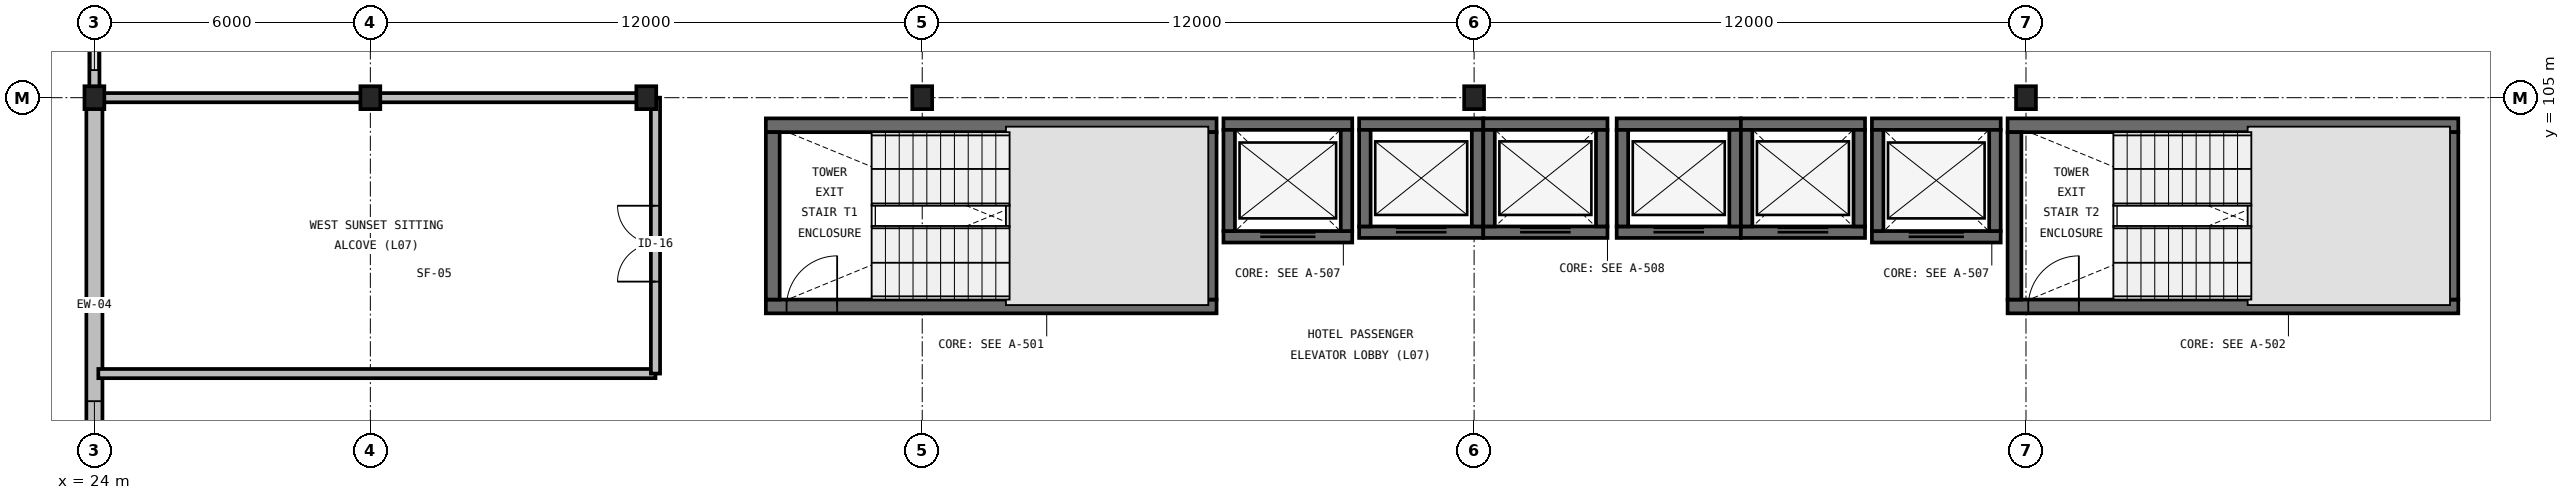
"""IFC4 building model, lengths in metres.
Left out: names, types, materials, properties, quantities, classifications, styles, units other than length and angle.
Written with IfcOpenShell. Run it as: python <this file> out.ifc"""

import sys

from ifc_helpers import new_model, si_unit, direction, frame, frame_2d, origin, origin_2d, place, context, subcontext, project, spatial, rectangle, i_section, extrude, element, fill, save


model = new_model("IFC4")
c1 = context("Model", 3, precision=1e-05, world=origin(), true_north=direction((0.0, 1.0)))
c2 = subcontext(c1, "Body", "Model", "MODEL_VIEW")
j1 = project(units=[si_unit("LENGTHUNIT", "METRE"), si_unit("PLANEANGLEUNIT", "RADIAN")], contexts=[c1])
p1 = place(None, origin())
s1 = spatial("IfcSite", under=j1, at=p1, CompositionType="ELEMENT")
p2 = place(p1, origin())
s2 = spatial("IfcBuilding", under=s1, at=p2, CompositionType="ELEMENT")
p3 = place(p2, frame((0.0, 0.0, 34.8)))
s3 = spatial("IfcBuildingStorey", under=s2, at=p3, CompositionType="ELEMENT", Elevation=34.8)
for number, where, z_axis, x_axis in (
    (1, (24.0, 105.0, 0.0), (0.0, 0.0, 1.0), (1.0, 0.0, 0.0)),
    (2, (30.0, 105.0, 0.0), (0.0, 0.0, 1.0), (1.0, 0.0, 0.0)),
    (3, (36.0, 105.0, 0.0), (0.0, 0.0, 1.0), (1.0, 0.0, 0.0)),
    (4, (42.0, 105.0, 0.0), (0.0, 0.0, 1.0), (1.0, 0.0, 0.0)),
    (5, (54.0, 105.0, 0.0), (0.0, 0.0, 1.0), (1.0, 0.0, 0.0)),
    (6, (66.0, 105.0, 0.0), (0.0, 0.0, 1.0), (1.0, 0.0, 0.0)),
):
    element("IfcColumn", number, at=place(p3, frame(where, z_axis=z_axis, x_axis=x_axis)), inside=s3, PredefinedType="COLUMN", context=c2, shape_type="SweptSolid", body=[
        extrude(i_section(OverallWidth=0.432, OverallDepth=0.498, WebThickness=0.056, FlangeThickness=0.089, FilletRadius=0.031, at=origin_2d()), origin(), (0.0, 0.0, 1.0), 3.6),
    ])
p4 = place(p3, frame((38.6, 100.46, 0.0), z_axis=(0.0, 0.0, 1.0), x_axis=(1.0, 0.0, 0.0)))
e7 = element("IfcWall", 7, at=p4, inside=s3, PredefinedType="SHEAR", context=c2, shape_type="SweptSolid", body=[
    extrude(rectangle(XDim=9.8, YDim=0.3, at=frame_2d((4.9, 0.0))), origin(), (0.0, 0.0, 1.0), 3.6),
])
p5 = place(p4, frame((0.45, 0.0, 0.0)))
e8 = element("IfcOpeningElement", 8, at=p5, cuts=e7, PredefinedType="OPENING", context=c2, shape_type="SweptSolid", body=[
    extrude(rectangle(XDim=1.1, YDim=2.2, at=frame_2d((0.55, 1.1))), frame((0.0, 0.165, 0.0), z_axis=(0.0, -1.0, 0.0), x_axis=(1.0, 0.0, 0.0)), (0.0, 0.0, 1.0), 0.33),
])
p6 = place(p3, frame((48.4, 104.4, 0.0), z_axis=(0.0, 0.0, 1.0), x_axis=(-1.0, 0.0, 0.0)))
e9 = element("IfcWall", 9, at=p6, inside=s3, PredefinedType="SHEAR", context=c2, shape_type="SweptSolid", body=[
    extrude(rectangle(XDim=9.8, YDim=0.3, at=frame_2d((4.9, 0.0))), origin(), (0.0, 0.0, 1.0), 3.6),
])
for number, where, z_axis, x_axis in (
    (10, (38.75, 104.25, 0.0), (0.0, 0.0, 1.0), (0.0, -1.0, 0.0)),
    (11, (48.25, 100.61, 0.0), (0.0, 0.0, 1.0), (0.0, 1.0, 0.0)),
):
    element("IfcWall", number, at=place(p3, frame(where, z_axis=z_axis, x_axis=x_axis)), inside=s3, PredefinedType="SHEAR", context=c2, shape_type="SweptSolid", body=[
        extrude(rectangle(XDim=3.64, YDim=0.3, at=frame_2d((1.82, 0.0))), origin(), (0.0, 0.0, 1.0), 3.6),
    ])
p7 = place(p3, frame((65.6, 100.46, 0.0), z_axis=(0.0, 0.0, 1.0), x_axis=(1.0, 0.0, 0.0)))
e12 = element("IfcWall", 12, at=p7, inside=s3, PredefinedType="SHEAR", context=c2, shape_type="SweptSolid", body=[
    extrude(rectangle(XDim=9.8, YDim=0.3, at=frame_2d((4.9, 0.0))), origin(), (0.0, 0.0, 1.0), 3.6),
])
p8 = place(p7, frame((0.45, 0.0, 0.0)))
e13 = element("IfcOpeningElement", 13, at=p8, cuts=e12, PredefinedType="OPENING", context=c2, shape_type="SweptSolid", body=[
    extrude(rectangle(XDim=1.1, YDim=2.2, at=frame_2d((0.55, 1.1))), frame((0.0, 0.165, 0.0), z_axis=(0.0, -1.0, 0.0), x_axis=(1.0, 0.0, 0.0)), (0.0, 0.0, 1.0), 0.33),
])
p9 = place(p3, frame((75.4, 104.4, 0.0), z_axis=(0.0, 0.0, 1.0), x_axis=(-1.0, 0.0, 0.0)))
e14 = element("IfcWall", 14, at=p9, inside=s3, PredefinedType="SHEAR", context=c2, shape_type="SweptSolid", body=[
    extrude(rectangle(XDim=9.8, YDim=0.3, at=frame_2d((4.9, 0.0))), origin(), (0.0, 0.0, 1.0), 3.6),
])
for number, where, z_axis, x_axis in (
    (15, (65.75, 104.25, 0.0), (0.0, 0.0, 1.0), (0.0, -1.0, 0.0)),
    (16, (75.25, 100.61, 0.0), (0.0, 0.0, 1.0), (0.0, 1.0, 0.0)),
):
    element("IfcWall", number, at=place(p3, frame(where, z_axis=z_axis, x_axis=x_axis)), inside=s3, PredefinedType="SHEAR", context=c2, shape_type="SweptSolid", body=[
        extrude(rectangle(XDim=3.64, YDim=0.3, at=frame_2d((1.82, 0.0))), origin(), (0.0, 0.0, 1.0), 3.6),
    ])
p10 = place(p3, frame((48.55, 101.975, 0.0), z_axis=(0.0, 0.0, 1.0), x_axis=(1.0, 0.0, 0.0)))
e17 = element("IfcWall", 17, at=p10, inside=s3, PredefinedType="SHEAR", context=c2, shape_type="SweptSolid", body=[
    extrude(rectangle(XDim=2.8, YDim=0.25, at=frame_2d((1.4, 0.0))), origin(), (0.0, 0.0, 1.0), 3.6),
])
p11 = place(p10, frame((0.8, 0.0, 0.0)))
e18 = element("IfcOpeningElement", 18, at=p11, cuts=e17, PredefinedType="OPENING", context=c2, shape_type="SweptSolid", body=[
    extrude(rectangle(XDim=1.2, YDim=2.2, at=frame_2d((0.6, 1.1))), frame((0.0, 0.14, 0.0), z_axis=(0.0, -1.0, 0.0), x_axis=(1.0, 0.0, 0.0)), (0.0, 0.0, 1.0), 0.28),
])
p12 = place(p3, frame((51.35, 104.425, 0.0), z_axis=(0.0, 0.0, 1.0), x_axis=(-1.0, 0.0, 0.0)))
e19 = element("IfcWall", 19, at=p12, inside=s3, PredefinedType="SHEAR", context=c2, shape_type="SweptSolid", body=[
    extrude(rectangle(XDim=2.8, YDim=0.25, at=frame_2d((1.4, 0.0))), origin(), (0.0, 0.0, 1.0), 3.6),
])
for number, where, z_axis, x_axis in (
    (20, (48.675, 104.3, 0.0), (0.0, 0.0, 1.0), (0.0, -1.0, 0.0)),
    (21, (51.225, 102.1, 0.0), (0.0, 0.0, 1.0), (0.0, 1.0, 0.0)),
):
    element("IfcWall", number, at=place(p3, frame(where, z_axis=z_axis, x_axis=x_axis)), inside=s3, PredefinedType="SHEAR", context=c2, shape_type="SweptSolid", body=[
        extrude(rectangle(XDim=2.2, YDim=0.25, at=frame_2d((1.1, 0.0))), origin(), (0.0, 0.0, 1.0), 3.6),
    ])
p13 = place(p3, frame((62.65, 101.975, 0.0), z_axis=(0.0, 0.0, 1.0), x_axis=(1.0, 0.0, 0.0)))
e22 = element("IfcWall", 22, at=p13, inside=s3, PredefinedType="SHEAR", context=c2, shape_type="SweptSolid", body=[
    extrude(rectangle(XDim=2.8, YDim=0.25, at=frame_2d((1.4, 0.0))), origin(), (0.0, 0.0, 1.0), 3.6),
])
p14 = place(p13, frame((0.8, 0.0, 0.0)))
e23 = element("IfcOpeningElement", 23, at=p14, cuts=e22, PredefinedType="OPENING", context=c2, shape_type="SweptSolid", body=[
    extrude(rectangle(XDim=1.2, YDim=2.2, at=frame_2d((0.6, 1.1))), frame((0.0, 0.14, 0.0), z_axis=(0.0, -1.0, 0.0), x_axis=(1.0, 0.0, 0.0)), (0.0, 0.0, 1.0), 0.28),
])
p15 = place(p3, frame((65.45, 104.425, 0.0), z_axis=(0.0, 0.0, 1.0), x_axis=(-1.0, 0.0, 0.0)))
e24 = element("IfcWall", 24, at=p15, inside=s3, PredefinedType="SHEAR", context=c2, shape_type="SweptSolid", body=[
    extrude(rectangle(XDim=2.8, YDim=0.25, at=frame_2d((1.4, 0.0))), origin(), (0.0, 0.0, 1.0), 3.6),
])
for number, where, z_axis, x_axis in (
    (25, (62.775, 104.3, 0.0), (0.0, 0.0, 1.0), (0.0, -1.0, 0.0)),
    (26, (65.325, 102.1, 0.0), (0.0, 0.0, 1.0), (0.0, 1.0, 0.0)),
):
    element("IfcWall", number, at=place(p3, frame(where, z_axis=z_axis, x_axis=x_axis)), inside=s3, PredefinedType="SHEAR", context=c2, shape_type="SweptSolid", body=[
        extrude(rectangle(XDim=2.2, YDim=0.25, at=frame_2d((1.1, 0.0))), origin(), (0.0, 0.0, 1.0), 3.6),
    ])
p16 = place(p3, frame((51.5, 102.075, 0.0), z_axis=(0.0, 0.0, 1.0), x_axis=(1.0, 0.0, 0.0)))
e27 = element("IfcWall", 27, at=p16, inside=s3, PredefinedType="SHEAR", context=c2, shape_type="SweptSolid", body=[
    extrude(rectangle(XDim=2.7, YDim=0.25, at=frame_2d((1.35, 0.0))), origin(), (0.0, 0.0, 1.0), 3.6),
])
p17 = place(p16, frame((0.8, 0.0, 0.0)))
e28 = element("IfcOpeningElement", 28, at=p17, cuts=e27, PredefinedType="OPENING", context=c2, shape_type="SweptSolid", body=[
    extrude(rectangle(XDim=1.1, YDim=2.2, at=frame_2d((0.55, 1.1))), frame((0.0, 0.14, 0.0), z_axis=(0.0, -1.0, 0.0), x_axis=(1.0, 0.0, 0.0)), (0.0, 0.0, 1.0), 0.28),
])
p18 = place(p3, frame((54.2, 104.425, 0.0), z_axis=(0.0, 0.0, 1.0), x_axis=(-1.0, 0.0, 0.0)))
e29 = element("IfcWall", 29, at=p18, inside=s3, PredefinedType="SHEAR", context=c2, shape_type="SweptSolid", body=[
    extrude(rectangle(XDim=2.7, YDim=0.25, at=frame_2d((1.35, 0.0))), origin(), (0.0, 0.0, 1.0), 3.6),
])
for number, where, z_axis, x_axis in (
    (30, (51.625, 104.3, 0.0), (0.0, 0.0, 1.0), (0.0, -1.0, 0.0)),
    (31, (54.075, 102.2, 0.0), (0.0, 0.0, 1.0), (0.0, 1.0, 0.0)),
):
    element("IfcWall", number, at=place(p3, frame(where, z_axis=z_axis, x_axis=x_axis)), inside=s3, PredefinedType="SHEAR", context=c2, shape_type="SweptSolid", body=[
        extrude(rectangle(XDim=2.1, YDim=0.25, at=frame_2d((1.05, 0.0))), origin(), (0.0, 0.0, 1.0), 3.6),
    ])
p19 = place(p3, frame((54.2, 102.075, 0.0), z_axis=(0.0, 0.0, 1.0), x_axis=(1.0, 0.0, 0.0)))
e32 = element("IfcWall", 32, at=p19, inside=s3, PredefinedType="SHEAR", context=c2, shape_type="SweptSolid", body=[
    extrude(rectangle(XDim=2.7, YDim=0.25, at=frame_2d((1.35, 0.0))), origin(), (0.0, 0.0, 1.0), 3.6),
])
p20 = place(p19, frame((0.8, 0.0, 0.0)))
e33 = element("IfcOpeningElement", 33, at=p20, cuts=e32, PredefinedType="OPENING", context=c2, shape_type="SweptSolid", body=[
    extrude(rectangle(XDim=1.1, YDim=2.2, at=frame_2d((0.55, 1.1))), frame((0.0, 0.14, 0.0), z_axis=(0.0, -1.0, 0.0), x_axis=(1.0, 0.0, 0.0)), (0.0, 0.0, 1.0), 0.28),
])
p21 = place(p3, frame((56.9, 104.425, 0.0), z_axis=(0.0, 0.0, 1.0), x_axis=(-1.0, 0.0, 0.0)))
e34 = element("IfcWall", 34, at=p21, inside=s3, PredefinedType="SHEAR", context=c2, shape_type="SweptSolid", body=[
    extrude(rectangle(XDim=2.7, YDim=0.25, at=frame_2d((1.35, 0.0))), origin(), (0.0, 0.0, 1.0), 3.6),
])
for number, where, z_axis, x_axis in (
    (35, (54.325, 104.3, 0.0), (0.0, 0.0, 1.0), (0.0, -1.0, 0.0)),
    (36, (56.775, 102.2, 0.0), (0.0, 0.0, 1.0), (0.0, 1.0, 0.0)),
):
    element("IfcWall", number, at=place(p3, frame(where, z_axis=z_axis, x_axis=x_axis)), inside=s3, PredefinedType="SHEAR", context=c2, shape_type="SweptSolid", body=[
        extrude(rectangle(XDim=2.1, YDim=0.25, at=frame_2d((1.05, 0.0))), origin(), (0.0, 0.0, 1.0), 3.6),
    ])
p22 = place(p3, frame((57.1, 102.075, 0.0), z_axis=(0.0, 0.0, 1.0), x_axis=(1.0, 0.0, 0.0)))
e37 = element("IfcWall", 37, at=p22, inside=s3, PredefinedType="SHEAR", context=c2, shape_type="SweptSolid", body=[
    extrude(rectangle(XDim=2.7, YDim=0.25, at=frame_2d((1.35, 0.0))), origin(), (0.0, 0.0, 1.0), 3.6),
])
p23 = place(p22, frame((0.8, 0.0, 0.0)))
e38 = element("IfcOpeningElement", 38, at=p23, cuts=e37, PredefinedType="OPENING", context=c2, shape_type="SweptSolid", body=[
    extrude(rectangle(XDim=1.1, YDim=2.2, at=frame_2d((0.55, 1.1))), frame((0.0, 0.14, 0.0), z_axis=(0.0, -1.0, 0.0), x_axis=(1.0, 0.0, 0.0)), (0.0, 0.0, 1.0), 0.28),
])
p24 = place(p3, frame((59.8, 104.425, 0.0), z_axis=(0.0, 0.0, 1.0), x_axis=(-1.0, 0.0, 0.0)))
e39 = element("IfcWall", 39, at=p24, inside=s3, PredefinedType="SHEAR", context=c2, shape_type="SweptSolid", body=[
    extrude(rectangle(XDim=2.7, YDim=0.25, at=frame_2d((1.35, 0.0))), origin(), (0.0, 0.0, 1.0), 3.6),
])
for number, where, z_axis, x_axis in (
    (40, (57.225, 104.3, 0.0), (0.0, 0.0, 1.0), (0.0, -1.0, 0.0)),
    (41, (59.675, 102.2, 0.0), (0.0, 0.0, 1.0), (0.0, 1.0, 0.0)),
):
    element("IfcWall", number, at=place(p3, frame(where, z_axis=z_axis, x_axis=x_axis)), inside=s3, PredefinedType="SHEAR", context=c2, shape_type="SweptSolid", body=[
        extrude(rectangle(XDim=2.1, YDim=0.25, at=frame_2d((1.05, 0.0))), origin(), (0.0, 0.0, 1.0), 3.6),
    ])
p25 = place(p3, frame((59.8, 102.075, 0.0), z_axis=(0.0, 0.0, 1.0), x_axis=(1.0, 0.0, 0.0)))
e42 = element("IfcWall", 42, at=p25, inside=s3, PredefinedType="SHEAR", context=c2, shape_type="SweptSolid", body=[
    extrude(rectangle(XDim=2.7, YDim=0.25, at=frame_2d((1.35, 0.0))), origin(), (0.0, 0.0, 1.0), 3.6),
])
p26 = place(p25, frame((0.8, 0.0, 0.0)))
e43 = element("IfcOpeningElement", 43, at=p26, cuts=e42, PredefinedType="OPENING", context=c2, shape_type="SweptSolid", body=[
    extrude(rectangle(XDim=1.1, YDim=2.2, at=frame_2d((0.55, 1.1))), frame((0.0, 0.14, 0.0), z_axis=(0.0, -1.0, 0.0), x_axis=(1.0, 0.0, 0.0)), (0.0, 0.0, 1.0), 0.28),
])
p27 = place(p3, frame((62.5, 104.425, 0.0), z_axis=(0.0, 0.0, 1.0), x_axis=(-1.0, 0.0, 0.0)))
e44 = element("IfcWall", 44, at=p27, inside=s3, PredefinedType="SHEAR", context=c2, shape_type="SweptSolid", body=[
    extrude(rectangle(XDim=2.7, YDim=0.25, at=frame_2d((1.35, 0.0))), origin(), (0.0, 0.0, 1.0), 3.6),
])
for number, where, z_axis, x_axis in (
    (45, (59.925, 104.3, 0.0), (0.0, 0.0, 1.0), (0.0, -1.0, 0.0)),
    (46, (62.375, 102.2, 0.0), (0.0, 0.0, 1.0), (0.0, 1.0, 0.0)),
):
    element("IfcWall", number, at=place(p3, frame(where, z_axis=z_axis, x_axis=x_axis)), inside=s3, PredefinedType="SHEAR", context=c2, shape_type="SweptSolid", body=[
        extrude(rectangle(XDim=2.1, YDim=0.25, at=frame_2d((1.05, 0.0))), origin(), (0.0, 0.0, 1.0), 3.6),
    ])
p28 = place(p3, frame((24.0, 105.0, 0.0), z_axis=(0.0, 0.0, 1.0), x_axis=(0.0, -1.0, 0.0)))
e47 = element("IfcWall", 47, at=p28, inside=s3, PredefinedType="STANDARD", context=c2, shape_type="SweptSolid", body=[
    extrude(rectangle(XDim=9.0, YDim=0.35, at=frame_2d((4.5, 0.0))), origin(), (0.0, 0.0, 1.0), 2.981),
])
p29 = place(p28, frame((6.6, 0.0, 0.85)))
e48 = element("IfcOpeningElement", 48, at=p29, cuts=e47, PredefinedType="OPENING", context=c2, shape_type="SweptSolid", body=[
    extrude(rectangle(XDim=1.8, YDim=1.5, at=frame_2d((0.9, 0.75))), frame((0.0, 0.19, 0.0), z_axis=(0.0, -1.0, 0.0), x_axis=(1.0, 0.0, 0.0)), (0.0, 0.0, 1.0), 0.38),
])
p30 = place(p3, frame((24.0, 117.0, 0.0), z_axis=(0.0, 0.0, 1.0), x_axis=(0.0, -1.0, 0.0)))
e49 = element("IfcWall", 49, at=p30, inside=s3, PredefinedType="PARAPET", context=c2, shape_type="SweptSolid", body=[
    extrude(rectangle(XDim=12.0, YDim=0.22, at=frame_2d((6.0, 0.0))), origin(), (0.0, 0.0, 1.0), 0.2),
])
p31 = place(p3, frame((24.085, 99.0, 0.0), z_axis=(0.0, 0.0, 1.0), x_axis=(1.0, 0.0, 0.0)))
e50 = element("IfcWall", 50, at=p31, inside=s3, PredefinedType="PARTITIONING", context=c2, shape_type="SweptSolid", body=[
    extrude(rectangle(XDim=12.115, YDim=0.2, at=frame_2d((6.057, 0.0))), origin(), (0.0, 0.0, 1.0), 3.29),
])
p32 = place(p3, frame((36.2, 99.0, 0.0), z_axis=(0.0, 0.0, 1.0), x_axis=(0.0, 1.0, 0.0)))
e51 = element("IfcWall", 51, at=p32, inside=s3, PredefinedType="PARTITIONING", context=c2, shape_type="SweptSolid", body=[
    extrude(rectangle(XDim=6.0, YDim=0.2, at=frame_2d((3.0, 0.0))), origin(), (0.0, 0.0, 1.0), 3.29),
])
p33 = place(p32, frame((2.0, 0.0, 0.0)))
e52 = element("IfcOpeningElement", 52, at=p33, cuts=e51, PredefinedType="OPENING", context=c2, shape_type="SweptSolid", body=[
    extrude(rectangle(XDim=1.65, YDim=2.25, at=frame_2d((0.825, 1.125))), frame((0.0, 0.115, 0.0), z_axis=(0.0, -1.0, 0.0), x_axis=(1.0, 0.0, 0.0)), (0.0, 0.0, 1.0), 0.23),
])
p34 = place(p3, frame((36.2, 105.0, 0.0), z_axis=(0.0, 0.0, 1.0), x_axis=(-1.0, 0.0, 0.0)))
e53 = element("IfcWall", 53, at=p34, inside=s3, PredefinedType="PARTITIONING", context=c2, shape_type="SweptSolid", body=[
    extrude(rectangle(XDim=12.115, YDim=0.2, at=frame_2d((6.057, 0.0))), origin(), (0.0, 0.0, 1.0), 2.736),
])
p35 = place(p5, origin())
e54 = element("IfcDoor", 54, at=p35, inside=s3, OperationType="SINGLE_SWING_RIGHT", PredefinedType="DOOR", context=c2, shape_type="SweptSolid", body=[
    extrude(rectangle(XDim=1.1, YDim=2.2, at=frame_2d((0.55, 1.1))), frame((0.0, 0.025, 0.0), z_axis=(0.0, -1.0, 0.0), x_axis=(1.0, 0.0, 0.0)), (0.0, 0.0, 1.0), 0.05),
])
fill(e8, e54)
p36 = place(p8, origin())
e55 = element("IfcDoor", 55, at=p36, inside=s3, OperationType="SINGLE_SWING_RIGHT", PredefinedType="DOOR", context=c2, shape_type="SweptSolid", body=[
    extrude(rectangle(XDim=1.1, YDim=2.2, at=frame_2d((0.55, 1.1))), frame((0.0, 0.025, 0.0), z_axis=(0.0, -1.0, 0.0), x_axis=(1.0, 0.0, 0.0)), (0.0, 0.0, 1.0), 0.05),
])
fill(e13, e55)
p37 = place(p11, origin())
e56 = element("IfcDoor", 56, at=p37, inside=s3, OperationType="DOUBLE_DOOR_SLIDING", PredefinedType="DOOR", context=c2, shape_type="SweptSolid", body=[
    extrude(rectangle(XDim=1.2, YDim=2.2, at=frame_2d((0.6, 1.1))), frame((0.0, 0.025, 0.0), z_axis=(0.0, -1.0, 0.0), x_axis=(1.0, 0.0, 0.0)), (0.0, 0.0, 1.0), 0.05),
])
fill(e18, e56)
p38 = place(p14, origin())
e57 = element("IfcDoor", 57, at=p38, inside=s3, OperationType="DOUBLE_DOOR_SLIDING", PredefinedType="DOOR", context=c2, shape_type="SweptSolid", body=[
    extrude(rectangle(XDim=1.2, YDim=2.2, at=frame_2d((0.6, 1.1))), frame((0.0, 0.025, 0.0), z_axis=(0.0, -1.0, 0.0), x_axis=(1.0, 0.0, 0.0)), (0.0, 0.0, 1.0), 0.05),
])
fill(e23, e57)
p39 = place(p17, origin())
e58 = element("IfcDoor", 58, at=p39, inside=s3, OperationType="DOUBLE_DOOR_SLIDING", PredefinedType="DOOR", context=c2, shape_type="SweptSolid", body=[
    extrude(rectangle(XDim=1.1, YDim=2.2, at=frame_2d((0.55, 1.1))), frame((0.0, 0.025, 0.0), z_axis=(0.0, -1.0, 0.0), x_axis=(1.0, 0.0, 0.0)), (0.0, 0.0, 1.0), 0.05),
])
fill(e28, e58)
p40 = place(p20, origin())
e59 = element("IfcDoor", 59, at=p40, inside=s3, OperationType="DOUBLE_DOOR_SLIDING", PredefinedType="DOOR", context=c2, shape_type="SweptSolid", body=[
    extrude(rectangle(XDim=1.1, YDim=2.2, at=frame_2d((0.55, 1.1))), frame((0.0, 0.025, 0.0), z_axis=(0.0, -1.0, 0.0), x_axis=(1.0, 0.0, 0.0)), (0.0, 0.0, 1.0), 0.05),
])
fill(e33, e59)
p41 = place(p23, origin())
e60 = element("IfcDoor", 60, at=p41, inside=s3, OperationType="DOUBLE_DOOR_SLIDING", PredefinedType="DOOR", context=c2, shape_type="SweptSolid", body=[
    extrude(rectangle(XDim=1.1, YDim=2.2, at=frame_2d((0.55, 1.1))), frame((0.0, 0.025, 0.0), z_axis=(0.0, -1.0, 0.0), x_axis=(1.0, 0.0, 0.0)), (0.0, 0.0, 1.0), 0.05),
])
fill(e38, e60)
p42 = place(p26, origin())
e61 = element("IfcDoor", 61, at=p42, inside=s3, OperationType="DOUBLE_DOOR_SLIDING", PredefinedType="DOOR", context=c2, shape_type="SweptSolid", body=[
    extrude(rectangle(XDim=1.1, YDim=2.2, at=frame_2d((0.55, 1.1))), frame((0.0, 0.025, 0.0), z_axis=(0.0, -1.0, 0.0), x_axis=(1.0, 0.0, 0.0)), (0.0, 0.0, 1.0), 0.05),
])
fill(e43, e61)
p43 = place(p29, origin())
e62 = element("IfcWindow", 62, at=p43, inside=s3, PartitioningType="SINGLE_PANEL", PredefinedType="WINDOW", context=c2, shape_type="SweptSolid", body=[
    extrude(rectangle(XDim=1.8, YDim=1.5, at=frame_2d((0.9, 0.75))), frame((0.0, 0.03, 0.0), z_axis=(0.0, -1.0, 0.0), x_axis=(1.0, 0.0, 0.0)), (0.0, 0.0, 1.0), 0.06),
])
fill(e48, e62)
p44 = place(p33, origin())
e63 = element("IfcDoor", 63, at=p44, inside=s3, OperationType="DOUBLE_DOOR_SINGLE_SWING", PredefinedType="DOOR", context=c2, shape_type="SweptSolid", body=[
    extrude(rectangle(XDim=1.65, YDim=2.25, at=frame_2d((0.825, 1.125))), frame((0.0, 0.025, 0.0), z_axis=(0.0, -1.0, 0.0), x_axis=(1.0, 0.0, 0.0)), (0.0, 0.0, 1.0), 0.05),
])
fill(e52, e63)
save(model, sys.argv[1])
